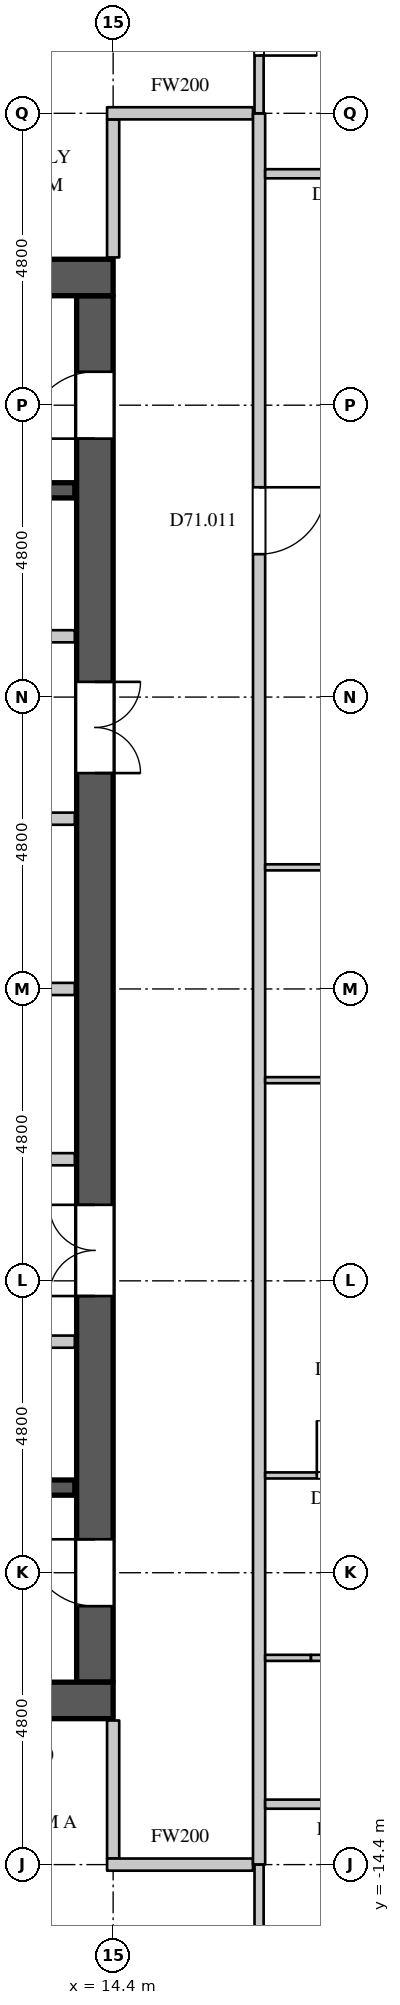
"""IFC4 building model, lengths in metres.
Left out: names, types, materials, properties, quantities, classifications, styles, units other than length and angle.
Written with IfcOpenShell. Run it as: python <this file> out.ifc"""

import sys

from ifc_helpers import new_model, si_unit, direction, frame, frame_2d, origin, place, context, subcontext, project, spatial, rectangle, extrude, element, fill, save


model = new_model("IFC4")
c1 = context("Model", 3, precision=1e-05, world=origin(), true_north=direction((0.0, 1.0)))
c2 = subcontext(c1, "Body", "Model", "MODEL_VIEW")
j1 = project(units=[si_unit("LENGTHUNIT", "METRE"), si_unit("PLANEANGLEUNIT", "RADIAN")], contexts=[c1])
p1 = place(None, origin())
s1 = spatial("IfcSite", under=j1, at=p1, CompositionType="ELEMENT")
p2 = place(p1, origin())
s2 = spatial("IfcBuilding", under=s1, at=p2, CompositionType="ELEMENT")
p3 = place(p2, frame((0.0, 0.0, 306.3)))
s3 = spatial("IfcBuildingStorey", under=s2, at=p3, CompositionType="ELEMENT", Elevation=306.3)
for number, where, z_axis, x_axis in (
    (1, (-14.4, 11.7, 0.0), (0.0, 0.0, 1.0), (1.0, 0.0, 0.0)),
    (2, (-14.4, -11.7, 0.0), (0.0, 0.0, 1.0), (1.0, 0.0, 0.0)),
):
    element("IfcWall", number, at=place(p3, frame(where, z_axis=z_axis, x_axis=x_axis)), inside=s3, PredefinedType="SHEAR", context=c2, shape_type="SweptSolid", body=[
        extrude(rectangle(XDim=28.8, YDim=0.6, at=frame_2d((14.4, 0.0))), origin(), (0.0, 0.0, 1.0), 4.2),
    ])
p4 = place(p3, frame((14.1, -11.4, 0.0), z_axis=(0.0, 0.0, 1.0), x_axis=(0.0, 1.0, 0.0)))
e3 = element("IfcWall", 3, at=p4, inside=s3, PredefinedType="SHEAR", context=c2, shape_type="SweptSolid", body=[
    extrude(rectangle(XDim=22.8, YDim=0.6, at=frame_2d((11.4, 0.0))), origin(), (0.0, 0.0, 1.0), 4.2),
])
p5 = place(p4, frame((20.45, 0.0, 0.0)))
e4 = element("IfcOpeningElement", 4, at=p5, cuts=e3, PredefinedType="OPENING", context=c2, shape_type="SweptSolid", body=[
    extrude(rectangle(XDim=1.1, YDim=2.2, at=frame_2d((0.55, 1.1))), frame((0.0, 0.31, 0.0), z_axis=(0.0, -1.0, 0.0), x_axis=(1.0, 0.0, 0.0)), (0.0, 0.0, 1.0), 0.62),
])
p6 = place(p4, frame((1.25, 0.0, 0.0)))
e5 = element("IfcOpeningElement", 5, at=p6, cuts=e3, PredefinedType="OPENING", context=c2, shape_type="SweptSolid", body=[
    extrude(rectangle(XDim=1.1, YDim=2.2, at=frame_2d((0.55, 1.1))), frame((0.0, 0.31, 0.0), z_axis=(0.0, -1.0, 0.0), x_axis=(1.0, 0.0, 0.0)), (0.0, 0.0, 1.0), 0.62),
])
p7 = place(p4, frame((14.95, 0.0, 0.0)))
e6 = element("IfcOpeningElement", 6, at=p7, cuts=e3, PredefinedType="OPENING", context=c2, shape_type="SweptSolid", body=[
    extrude(rectangle(XDim=1.5, YDim=2.4, at=frame_2d((0.75, 1.2))), frame((0.0, 0.31, 0.0), z_axis=(0.0, -1.0, 0.0), x_axis=(1.0, 0.0, 0.0)), (0.0, 0.0, 1.0), 0.62),
])
p8 = place(p4, frame((6.35, 0.0, 0.0)))
e7 = element("IfcOpeningElement", 7, at=p8, cuts=e3, PredefinedType="OPENING", context=c2, shape_type="SweptSolid", body=[
    extrude(rectangle(XDim=1.5, YDim=2.4, at=frame_2d((0.75, 1.2))), frame((0.0, 0.31, 0.0), z_axis=(0.0, -1.0, 0.0), x_axis=(1.0, 0.0, 0.0)), (0.0, 0.0, 1.0), 0.62),
])
p9 = place(p3, frame((14.4, -14.3, 0.0), z_axis=(0.0, 0.0, 1.0), x_axis=(0.0, 1.0, 0.0)))
e8 = element("IfcWall", 8, at=p9, inside=s3, PredefinedType="PARTITIONING", context=c2, shape_type="SweptSolid", body=[
    extrude(rectangle(XDim=2.27, YDim=0.2, at=frame_2d((1.135, 0.0))), origin(), (0.0, 0.0, 1.0), 3.9),
])
p10 = place(p3, frame((14.3, -14.4, 0.0), z_axis=(0.0, 0.0, 1.0), x_axis=(1.0, 0.0, 0.0)))
e9 = element("IfcWall", 9, at=p10, inside=s3, PredefinedType="PARTITIONING", context=c2, shape_type="SweptSolid", body=[
    extrude(rectangle(XDim=2.4, YDim=0.2, at=frame_2d((1.2, 0.0))), origin(), (0.0, 0.0, 1.0), 3.9),
])
p11 = place(p3, frame((14.4, 12.03, 0.0), z_axis=(0.0, 0.0, 1.0), x_axis=(0.0, 1.0, 0.0)))
e10 = element("IfcWall", 10, at=p11, inside=s3, PredefinedType="PARTITIONING", context=c2, shape_type="SweptSolid", body=[
    extrude(rectangle(XDim=2.27, YDim=0.2, at=frame_2d((1.135, 0.0))), origin(), (0.0, 0.0, 1.0), 3.9),
])
p12 = place(p3, frame((14.3, 14.4, 0.0), z_axis=(0.0, 0.0, 1.0), x_axis=(1.0, 0.0, 0.0)))
e11 = element("IfcWall", 11, at=p12, inside=s3, PredefinedType="PARTITIONING", context=c2, shape_type="SweptSolid", body=[
    extrude(rectangle(XDim=2.4, YDim=0.2, at=frame_2d((1.2, 0.0))), origin(), (0.0, 0.0, 1.0), 3.9),
])
p13 = place(p3, frame((16.8, -14.4, 0.0), z_axis=(0.0, 0.0, 1.0), x_axis=(0.0, 1.0, 0.0)))
e12 = element("IfcWall", 12, at=p13, inside=s3, PredefinedType="PARTITIONING", context=c2, shape_type="SweptSolid", body=[
    extrude(rectangle(XDim=28.8, YDim=0.2, at=frame_2d((14.4, 0.0))), origin(), (0.0, 0.0, 1.0), 3.9),
])
p14 = place(p13, frame((21.55, 0.0, 0.0)))
e13 = element("IfcOpeningElement", 13, at=p14, cuts=e12, PredefinedType="OPENING", context=c2, shape_type="SweptSolid", body=[
    extrude(rectangle(XDim=1.1, YDim=2.4, at=frame_2d((0.55, 1.2))), frame((0.0, 0.11, 0.0), z_axis=(0.0, -1.0, 0.0), x_axis=(1.0, 0.0, 0.0)), (0.0, 0.0, 1.0), 0.22),
])
p15 = place(p3, frame((16.8, -19.828, 0.0), z_axis=(0.0, 0.0, 1.0), x_axis=(0.0, 1.0, 0.0)))
e14 = element("IfcWall", 14, at=p15, inside=s3, PredefinedType="PARTITIONING", context=c2, shape_type="SweptSolid", body=[
    extrude(rectangle(XDim=5.428, YDim=0.15, at=frame_2d((2.714, 0.0))), origin(), (0.0, 0.0, 1.0), 3.9),
])
p16 = place(p15, frame((2.7, 0.0, 0.0)))
e15 = element("IfcOpeningElement", 15, at=p16, cuts=e14, PredefinedType="OPENING", context=c2, shape_type="SweptSolid", body=[
    extrude(rectangle(XDim=0.95, YDim=2.2, at=frame_2d((0.475, 1.1))), frame((0.0, 0.085, 0.0), z_axis=(0.0, -1.0, 0.0), x_axis=(1.0, 0.0, 0.0)), (0.0, 0.0, 1.0), 0.17),
])
p17 = place(p3, frame((16.9, -13.406, 0.0), z_axis=(0.0, 0.0, 1.0), x_axis=(1.0, 0.0, 0.0)))
e16 = element("IfcWall", 16, at=p17, inside=s3, PredefinedType="PARTITIONING", context=c2, shape_type="SweptSolid", body=[
    extrude(rectangle(XDim=8.324, YDim=0.15, at=frame_2d((4.162, 0.0))), origin(), (0.0, 0.0, 1.0), 3.9),
])
p18 = place(p17, frame((4.95, 0.0, 0.0)))
e17 = element("IfcOpeningElement", 17, at=p18, cuts=e16, PredefinedType="OPENING", context=c2, shape_type="SweptSolid", body=[
    extrude(rectangle(XDim=1.5, YDim=2.2, at=frame_2d((0.75, 1.1))), frame((0.0, 0.085, 0.0), z_axis=(0.0, -1.0, 0.0), x_axis=(1.0, 0.0, 0.0)), (0.0, 0.0, 1.0), 0.17),
])
p19 = place(p17, frame((0.95, 0.0, 0.0)))
e18 = element("IfcOpeningElement", 18, at=p19, cuts=e16, PredefinedType="OPENING", context=c2, shape_type="SweptSolid", body=[
    extrude(rectangle(XDim=0.9, YDim=2.2, at=frame_2d((0.45, 1.1))), frame((0.0, 0.085, 0.0), z_axis=(0.0, -1.0, 0.0), x_axis=(1.0, 0.0, 0.0)), (0.0, 0.0, 1.0), 0.17),
])
p20 = place(p3, frame((16.9, 13.406, 0.0), z_axis=(0.0, 0.0, 1.0), x_axis=(1.0, 0.0, 0.0)))
e19 = element("IfcWall", 19, at=p20, inside=s3, PredefinedType="PARTITIONING", context=c2, shape_type="SweptSolid", body=[
    extrude(rectangle(XDim=8.324, YDim=0.15, at=frame_2d((4.162, 0.0))), origin(), (0.0, 0.0, 1.0), 3.9),
])
p21 = place(p20, frame((1.2, 0.0, 0.0)))
e20 = element("IfcOpeningElement", 20, at=p21, cuts=e19, PredefinedType="OPENING", context=c2, shape_type="SweptSolid", body=[
    extrude(rectangle(XDim=0.95, YDim=2.2, at=frame_2d((0.475, 1.1))), frame((0.0, 0.085, 0.0), z_axis=(0.0, -1.0, 0.0), x_axis=(1.0, 0.0, 0.0)), (0.0, 0.0, 1.0), 0.17),
])
p22 = place(p3, frame((16.8, 14.4, 0.0), z_axis=(0.0, 0.0, 1.0), x_axis=(0.0, 1.0, 0.0)))
e21 = element("IfcWall", 21, at=p22, inside=s3, PredefinedType="PARTITIONING", context=c2, shape_type="SweptSolid", body=[
    extrude(rectangle(XDim=5.428, YDim=0.15, at=frame_2d((2.714, 0.0))), origin(), (0.0, 0.0, 1.0), 3.9),
])
p23 = place(p22, frame((0.95, 0.0, 0.0)))
e22 = element("IfcOpeningElement", 22, at=p23, cuts=e21, PredefinedType="OPENING", context=c2, shape_type="SweptSolid", body=[
    extrude(rectangle(XDim=0.95, YDim=2.2, at=frame_2d((0.475, 1.1))), frame((0.0, 0.085, 0.0), z_axis=(0.0, -1.0, 0.0), x_axis=(1.0, 0.0, 0.0)), (0.0, 0.0, 1.0), 0.17),
])
p24 = place(p3, frame((3.82, 5.8, 0.0), z_axis=(0.0, 0.0, 1.0), x_axis=(1.0, 0.0, 0.0)))
e23 = element("IfcWall", 23, at=p24, inside=s3, PredefinedType="PARTITIONING", context=c2, shape_type="SweptSolid", body=[
    extrude(rectangle(XDim=9.95, YDim=0.2, at=frame_2d((4.975, 0.0))), origin(), (0.0, 0.0, 1.0), 3.9),
])
p25 = place(p24, frame((4.5, 0.0, 0.0)))
e24 = element("IfcOpeningElement", 24, at=p25, cuts=e23, PredefinedType="OPENING", context=c2, shape_type="SweptSolid", body=[
    extrude(rectangle(XDim=0.9, YDim=2.2, at=frame_2d((0.45, 1.1))), frame((0.0, 0.11, 0.0), z_axis=(0.0, -1.0, 0.0), x_axis=(1.0, 0.0, 0.0)), (0.0, 0.0, 1.0), 0.22),
])
p26 = place(p3, frame((7.8, -2.8, 0.0), z_axis=(0.0, 0.0, 1.0), x_axis=(1.0, 0.0, 0.0)))
e25 = element("IfcWall", 25, at=p26, inside=s3, PredefinedType="PARTITIONING", context=c2, shape_type="SweptSolid", body=[
    extrude(rectangle(XDim=5.97, YDim=0.2, at=frame_2d((2.985, 0.0))), origin(), (0.0, 0.0, 1.0), 3.9),
])
p27 = place(p26, frame((2.55, 0.0, 0.0)))
e26 = element("IfcOpeningElement", 26, at=p27, cuts=e25, PredefinedType="OPENING", context=c2, shape_type="SweptSolid", body=[
    extrude(rectangle(XDim=0.9, YDim=2.2, at=frame_2d((0.45, 1.1))), frame((0.0, 0.11, 0.0), z_axis=(0.0, -1.0, 0.0), x_axis=(1.0, 0.0, 0.0)), (0.0, 0.0, 1.0), 0.22),
])
p28 = place(p3, frame((7.8, 0.0, 0.0), z_axis=(0.0, 0.0, 1.0), x_axis=(1.0, 0.0, 0.0)))
e27 = element("IfcWall", 27, at=p28, inside=s3, PredefinedType="PARTITIONING", context=c2, shape_type="SweptSolid", body=[
    extrude(rectangle(XDim=5.97, YDim=0.2, at=frame_2d((2.985, 0.0))), origin(), (0.0, 0.0, 1.0), 3.9),
])
p29 = place(p3, frame((8.42, -5.8, 0.0), z_axis=(0.0, 0.0, 1.0), x_axis=(1.0, 0.0, 0.0)))
e28 = element("IfcWall", 28, at=p29, inside=s3, PredefinedType="PARTITIONING", context=c2, shape_type="SweptSolid", body=[
    extrude(rectangle(XDim=5.35, YDim=0.2, at=frame_2d((2.675, 0.0))), origin(), (0.0, 0.0, 1.0), 3.9),
])
p30 = place(p29, frame((2.25, 0.0, 0.0)))
e29 = element("IfcOpeningElement", 29, at=p30, cuts=e28, PredefinedType="OPENING", context=c2, shape_type="SweptSolid", body=[
    extrude(rectangle(XDim=0.9, YDim=2.2, at=frame_2d((0.45, 1.1))), frame((0.0, 0.11, 0.0), z_axis=(0.0, -1.0, 0.0), x_axis=(1.0, 0.0, 0.0)), (0.0, 0.0, 1.0), 0.22),
])
p31 = place(p3, frame((10.42, 2.8, 0.0), z_axis=(0.0, 0.0, 1.0), x_axis=(1.0, 0.0, 0.0)))
e30 = element("IfcWall", 30, at=p31, inside=s3, PredefinedType="PARTITIONING", context=c2, shape_type="SweptSolid", body=[
    extrude(rectangle(XDim=3.35, YDim=0.2, at=frame_2d((1.675, 0.0))), origin(), (0.0, 0.0, 1.0), 3.9),
])
p32 = place(p31, frame((1.35, 0.0, 0.0)))
e31 = element("IfcOpeningElement", 31, at=p32, cuts=e30, PredefinedType="OPENING", context=c2, shape_type="SweptSolid", body=[
    extrude(rectangle(XDim=0.6, YDim=2.0, at=frame_2d((0.3, 1.0))), frame((0.0, 0.11, 0.0), z_axis=(0.0, -1.0, 0.0), x_axis=(1.0, 0.0, 0.0)), (0.0, 0.0, 1.0), 0.22),
])
for number, where, z_axis, x_axis in (
    (32, (5.275, -8.2, 0.0), (0.0, 0.0, 1.0), (1.0, 0.0, 0.0)),
    (33, (5.275, 8.2, 0.0), (0.0, 0.0, 1.0), (1.0, 0.0, 0.0)),
):
    element("IfcWall", number, at=place(p3, frame(where, z_axis=z_axis, x_axis=x_axis)), inside=s3, PredefinedType="SHEAR", context=c2, shape_type="SweptSolid", body=[
        extrude(rectangle(XDim=8.495, YDim=0.25, at=frame_2d((4.248, 0.0))), origin(), (0.0, 0.0, 1.0), 3.9),
    ])
p33 = place(p3, frame((16.9, -11.0, 0.0), z_axis=(0.0, 0.0, 1.0), x_axis=(1.0, 0.0, 0.0)))
e34 = element("IfcWall", 34, at=p33, inside=s3, PredefinedType="PARTITIONING", context=c2, shape_type="SweptSolid", body=[
    extrude(rectangle(XDim=0.754, YDim=0.1, at=frame_2d((0.377, 0.0))), origin(), (0.0, 0.0, 1.0), 3.3),
])
p34 = place(p3, frame((17.654, -11.0, 0.0), z_axis=(0.0, 0.0, 1.0), x_axis=(1.0, 0.0, 0.0)))
e35 = element("IfcWall", 35, at=p34, inside=s3, PredefinedType="PARTITIONING", context=c2, shape_type="SweptSolid", body=[
    extrude(rectangle(XDim=1.921, YDim=0.1, at=frame_2d((0.96, 0.0))), origin(), (0.0, 0.0, 1.0), 3.9),
])
p35 = place(p3, frame((16.9, -8.0, 0.0), z_axis=(0.0, 0.0, 1.0), x_axis=(1.0, 0.0, 0.0)))
e36 = element("IfcWall", 36, at=p35, inside=s3, PredefinedType="PARTITIONING", context=c2, shape_type="SweptSolid", body=[
    extrude(rectangle(XDim=2.675, YDim=0.1, at=frame_2d((1.337, 0.0))), origin(), (0.0, 0.0, 1.0), 3.9),
])
p36 = place(p35, frame((0.85, 0.0, 0.0)))
e37 = element("IfcOpeningElement", 37, at=p36, cuts=e36, PredefinedType="OPENING", context=c2, shape_type="SweptSolid", body=[
    extrude(rectangle(XDim=0.9, YDim=2.2, at=frame_2d((0.45, 1.1))), frame((0.0, 0.06, 0.0), z_axis=(0.0, -1.0, 0.0), x_axis=(1.0, 0.0, 0.0)), (0.0, 0.0, 1.0), 0.12),
])
p37 = place(p3, frame((16.9, -1.5, 0.0), z_axis=(0.0, 0.0, 1.0), x_axis=(1.0, 0.0, 0.0)))
e38 = element("IfcWall", 38, at=p37, inside=s3, PredefinedType="PARTITIONING", context=c2, shape_type="SweptSolid", body=[
    extrude(rectangle(XDim=3.625, YDim=0.1, at=frame_2d((1.812, 0.0))), origin(), (0.0, 0.0, 1.0), 3.9),
])
p38 = place(p3, frame((16.9, 2.0, 0.0), z_axis=(0.0, 0.0, 1.0), x_axis=(1.0, 0.0, 0.0)))
e39 = element("IfcWall", 39, at=p38, inside=s3, PredefinedType="PARTITIONING", context=c2, shape_type="SweptSolid", body=[
    extrude(rectangle(XDim=3.65, YDim=0.1, at=frame_2d((1.825, 0.0))), origin(), (0.0, 0.0, 1.0), 3.9),
])
p39 = place(p38, frame((1.35, 0.0, 0.0)))
e40 = element("IfcOpeningElement", 40, at=p39, cuts=e39, PredefinedType="OPENING", context=c2, shape_type="SweptSolid", body=[
    extrude(rectangle(XDim=0.9, YDim=2.2, at=frame_2d((0.45, 1.1))), frame((0.0, 0.06, 0.0), z_axis=(0.0, -1.0, 0.0), x_axis=(1.0, 0.0, 0.0)), (0.0, 0.0, 1.0), 0.12),
])
p40 = place(p5, origin())
e41 = element("IfcDoor", 41, at=p40, inside=s3, OperationType="SINGLE_SWING_LEFT", PredefinedType="DOOR", context=c2, shape_type="SweptSolid", body=[
    extrude(rectangle(XDim=1.1, YDim=2.2, at=frame_2d((0.55, 1.1))), frame((0.0, 0.295, 0.0), z_axis=(0.0, -1.0, 0.0), x_axis=(1.0, 0.0, 0.0)), (0.0, 0.0, 1.0), 0.05),
])
fill(e4, e41)
p41 = place(p6, origin())
e42 = element("IfcDoor", 42, at=p41, inside=s3, OperationType="SINGLE_SWING_RIGHT", PredefinedType="DOOR", context=c2, shape_type="SweptSolid", body=[
    extrude(rectangle(XDim=1.1, YDim=2.2, at=frame_2d((0.55, 1.1))), frame((0.0, 0.295, 0.0), z_axis=(0.0, -1.0, 0.0), x_axis=(1.0, 0.0, 0.0)), (0.0, 0.0, 1.0), 0.05),
])
fill(e5, e42)
p42 = place(p7, origin())
e43 = element("IfcDoor", 43, at=p42, inside=s3, OperationType="DOUBLE_DOOR_SINGLE_SWING", PredefinedType="DOOR", context=c2, shape_type="SweptSolid", body=[
    extrude(rectangle(XDim=1.5, YDim=2.4, at=frame_2d((0.75, 1.2))), frame((0.0, -0.245, 0.0), z_axis=(0.0, -1.0, 0.0), x_axis=(1.0, 0.0, 0.0)), (0.0, 0.0, 1.0), 0.05),
])
fill(e6, e43)
p43 = place(p8, origin())
e44 = element("IfcDoor", 44, at=p43, inside=s3, OperationType="DOUBLE_DOOR_SINGLE_SWING", PredefinedType="DOOR", context=c2, shape_type="SweptSolid", body=[
    extrude(rectangle(XDim=1.5, YDim=2.4, at=frame_2d((0.75, 1.2))), frame((0.0, 0.295, 0.0), z_axis=(0.0, -1.0, 0.0), x_axis=(1.0, 0.0, 0.0)), (0.0, 0.0, 1.0), 0.05),
])
fill(e7, e44)
p44 = place(p14, origin())
e45 = element("IfcDoor", 45, at=p44, inside=s3, OperationType="SINGLE_SWING_LEFT", PredefinedType="DOOR", context=c2, shape_type="SweptSolid", body=[
    extrude(rectangle(XDim=1.1, YDim=2.4, at=frame_2d((0.55, 1.2))), frame((0.0, 0.025, 0.0), z_axis=(0.0, -1.0, 0.0), x_axis=(1.0, 0.0, 0.0)), (0.0, 0.0, 1.0), 0.05),
])
fill(e13, e45)
p45 = place(p23, origin())
e46 = element("IfcDoor", 46, at=p45, inside=s3, OperationType="SINGLE_SWING_RIGHT", PredefinedType="DOOR", context=c2, shape_type="SweptSolid", body=[
    extrude(rectangle(XDim=0.95, YDim=2.2, at=frame_2d((0.475, 1.1))), frame((0.0, 0.025, 0.0), z_axis=(0.0, -1.0, 0.0), x_axis=(1.0, 0.0, 0.0)), (0.0, 0.0, 1.0), 0.05),
])
fill(e22, e46)
p46 = place(p36, origin())
e47 = element("IfcDoor", 47, at=p46, inside=s3, OperationType="SINGLE_SWING_LEFT", PredefinedType="DOOR", context=c2, shape_type="SweptSolid", body=[
    extrude(rectangle(XDim=0.9, YDim=2.2, at=frame_2d((0.45, 1.1))), frame((0.0, 0.025, 0.0), z_axis=(0.0, -1.0, 0.0), x_axis=(1.0, 0.0, 0.0)), (0.0, 0.0, 1.0), 0.05),
])
fill(e37, e47)
save(model, sys.argv[1])
